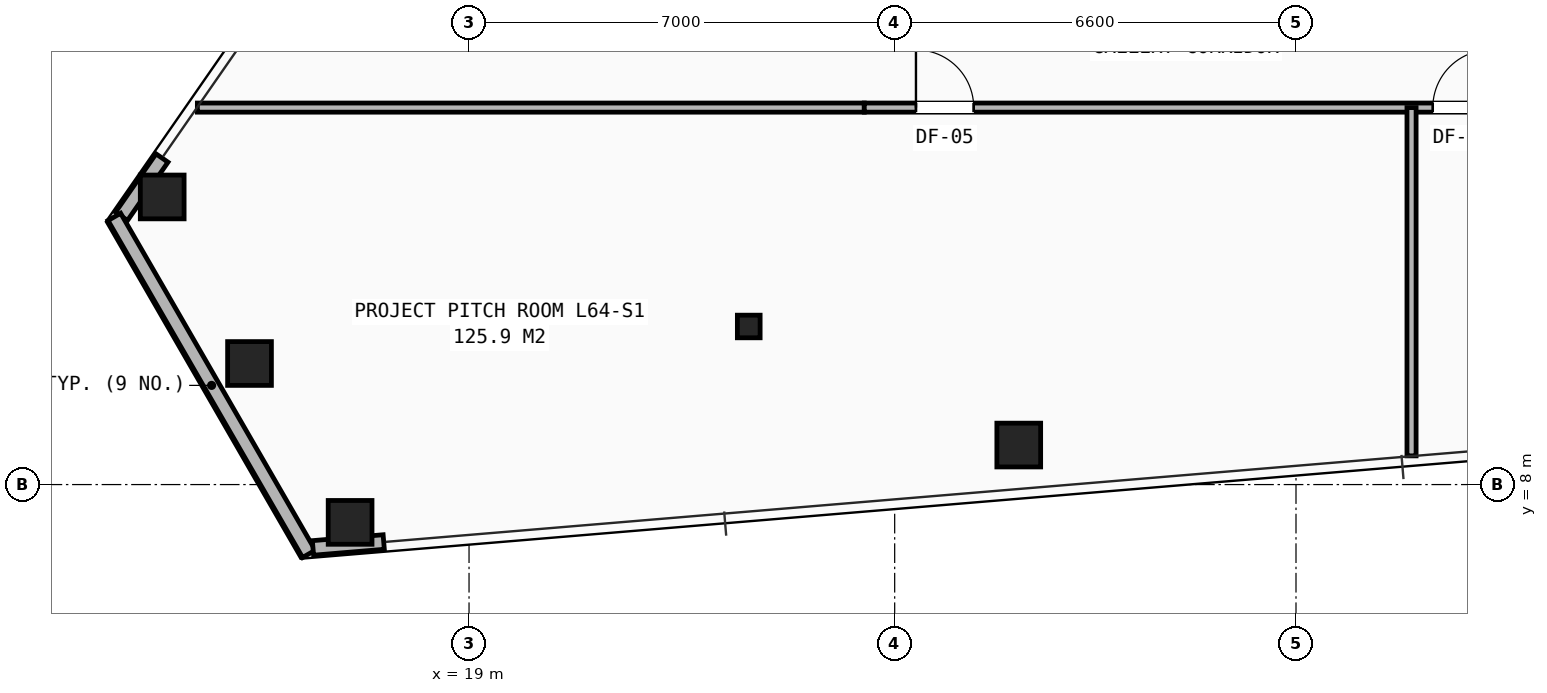
"""IFC4 building model, lengths in metres.
Left out: names, types, materials, properties, quantities, classifications, styles, units other than length and angle.
Written with IfcOpenShell. Run it as: python <this file> out.ifc"""

import sys

from ifc_helpers import new_model, si_unit, direction, frame, frame_2d, origin, origin_2d, place, context, subcontext, project, spatial, rectangle, hollow_rectangle, i_section, extrude, element, fill, save


model = new_model("IFC4")
c1 = context("Model", 3, precision=1e-05, world=origin(), true_north=direction((0.0, 1.0)))
c2 = subcontext(c1, "Body", "Model", "MODEL_VIEW")
j1 = project(units=[si_unit("LENGTHUNIT", "METRE"), si_unit("PLANEANGLEUNIT", "RADIAN")], contexts=[c1])
p1 = place(None, origin())
s1 = spatial("IfcSite", under=j1, at=p1, CompositionType="ELEMENT")
p2 = place(p1, origin())
s2 = spatial("IfcBuilding", under=s1, at=p2, CompositionType="ELEMENT")
p3 = place(p2, frame((0.0, 0.0, 225.9)))
s3 = spatial("IfcBuildingStorey", under=s2, at=p3, CompositionType="ELEMENT", Elevation=225.9)
p4 = place(p3, frame((23.6, 10.6, 0.0), z_axis=(0.0, 0.0, 1.0), x_axis=(1.0, 0.0, 0.0)))
e1 = element("IfcColumn", 1, at=p4, inside=s3, PredefinedType="COLUMN", context=c2, shape_type="SweptSolid", body=[
    extrude(i_section(OverallWidth=0.374, OverallDepth=0.372, WebThickness=0.016, FlangeThickness=0.026, at=origin_2d()), origin(), (0.0, 0.0, 1.0), 3.5),
])
for number, where, z_axis, x_axis in (
    (2, (13.954, 12.73, 0.0), (0.0, 0.0, 1.0), (1.0, 0.0, 0.0)),
    (3, (15.39, 9.991, 0.0), (0.0, 0.0, 1.0), (1.0, 0.0, 0.0)),
    (4, (17.044, 7.378, 0.0), (0.0, 0.0, 1.0), (1.0, 0.0, 0.0)),
    (5, (28.041, 8.65, 0.0), (0.0, 0.0, 1.0), (1.0, 0.0, 0.0)),
):
    element("IfcColumn", number, at=place(p3, frame(where, z_axis=z_axis, x_axis=x_axis)), inside=s3, PredefinedType="COLUMN", context=c2, shape_type="SweptSolid", body=[
        extrude(hollow_rectangle(XDim=0.72, YDim=0.72, WallThickness=0.05, at=origin_2d()), origin(), (0.0, 0.0, 1.0), 3.5),
    ])
p5 = place(p3, frame((13.95, 13.371, 0.0), z_axis=(0.0, 0.0, 1.0), x_axis=(-0.57028607051, -0.821446162437, 0.0)))
e6 = element("IfcWall", 6, at=p5, inside=s3, PredefinedType="SHEAR", context=c2, shape_type="SweptSolid", body=[
    extrude(rectangle(XDim=1.167, YDim=0.24, at=frame_2d((0.584, 0.0))), origin(), (0.0, 0.0, 1.0), 2.623),
])
p6 = place(p3, frame((16.366, 6.86, 0.0), z_axis=(0.0, 0.0, 1.0), x_axis=(-0.499999833739, 0.866025499775, 0.0)))
e7 = element("IfcWall", 7, at=p6, inside=s3, PredefinedType="SHEAR", context=c2, shape_type="SweptSolid", body=[
    extrude(rectangle(XDim=6.4, YDim=0.24, at=frame_2d((3.2, 0.0))), origin(), (0.0, 0.0, 1.0), 2.623),
])
p7 = place(p3, frame((16.434, 6.958, 0.0), z_axis=(0.0, 0.0, 1.0), x_axis=(0.99652987462, 0.083235863609, 0.0)))
e8 = element("IfcWall", 8, at=p7, inside=s3, PredefinedType="SHEAR", context=c2, shape_type="SweptSolid", body=[
    extrude(rectangle(XDim=1.167, YDim=0.24, at=frame_2d((0.584, 0.0))), origin(), (0.0, 0.0, 1.0), 2.623),
])
p8 = place(p3, frame((14.532, 14.2, 0.0), z_axis=(0.0, 0.0, 1.0), x_axis=(1.0, 0.0, 0.0)))
e9 = element("IfcWall", 9, at=p8, inside=s3, PredefinedType="PARTITIONING", context=c2, shape_type="SweptSolid", body=[
    extrude(rectangle(XDim=10.968, YDim=0.15, at=frame_2d((5.484, 0.0))), origin(), (0.0, 0.0, 1.0), 2.292),
])
p9 = place(p3, frame((25.5, 14.2, 0.0), z_axis=(0.0, 0.0, 1.0), x_axis=(1.0, 0.0, 0.0)))
e10 = element("IfcWall", 10, at=p9, inside=s3, PredefinedType="PARTITIONING", context=c2, shape_type="SweptSolid", body=[
    extrude(rectangle(XDim=29.0, YDim=0.15, at=frame_2d((14.5, 0.0))), origin(), (0.0, 0.0, 1.0), 2.292),
])
p10 = place(p9, frame((0.85, 0.0, 0.0)))
e11 = element("IfcOpeningElement", 11, at=p10, cuts=e10, PredefinedType="OPENING", context=c2, shape_type="SweptSolid", body=[
    extrude(rectangle(XDim=0.95, YDim=2.1, at=frame_2d((0.475, 1.05))), frame((0.0, 0.085, 0.0), z_axis=(0.0, -1.0, 0.0), x_axis=(1.0, 0.0, 0.0)), (0.0, 0.0, 1.0), 0.17),
])
p11 = place(p9, frame((9.35, 0.0, 0.0)))
e12 = element("IfcOpeningElement", 12, at=p11, cuts=e10, PredefinedType="OPENING", context=c2, shape_type="SweptSolid", body=[
    extrude(rectangle(XDim=0.95, YDim=2.1, at=frame_2d((0.475, 1.05))), frame((0.0, 0.085, 0.0), z_axis=(0.0, -1.0, 0.0), x_axis=(1.0, 0.0, 0.0)), (0.0, 0.0, 1.0), 0.17),
])
p12 = place(p9, frame((16.05, 0.0, 0.0)))
e13 = element("IfcOpeningElement", 13, at=p12, cuts=e10, PredefinedType="OPENING", context=c2, shape_type="SweptSolid", body=[
    extrude(rectangle(XDim=0.95, YDim=2.1, at=frame_2d((0.475, 1.05))), frame((0.0, 0.085, 0.0), z_axis=(0.0, -1.0, 0.0), x_axis=(1.0, 0.0, 0.0)), (0.0, 0.0, 1.0), 0.17),
])
p13 = place(p3, frame((34.5, 8.472, 0.0), z_axis=(0.0, 0.0, 1.0), x_axis=(0.0, 1.0, 0.0)))
e14 = element("IfcWall", 14, at=p13, inside=s3, PredefinedType="PARTITIONING", context=c2, shape_type="SweptSolid", body=[
    extrude(rectangle(XDim=5.728, YDim=0.15, at=frame_2d((2.864, 0.0))), origin(), (0.0, 0.0, 1.0), 2.292),
])
p14 = place(p10, origin())
e15 = element("IfcDoor", 15, at=p14, inside=s3, OperationType="SINGLE_SWING_LEFT", PredefinedType="DOOR", context=c2, shape_type="SweptSolid", body=[
    extrude(rectangle(XDim=0.95, YDim=2.1, at=frame_2d((0.475, 1.05))), frame((0.0, 0.025, 0.0), z_axis=(0.0, -1.0, 0.0), x_axis=(1.0, 0.0, 0.0)), (0.0, 0.0, 1.0), 0.05),
])
fill(e11, e15)
p15 = place(p11, origin())
e16 = element("IfcDoor", 16, at=p15, inside=s3, OperationType="SINGLE_SWING_RIGHT", PredefinedType="DOOR", context=c2, shape_type="SweptSolid", body=[
    extrude(rectangle(XDim=0.95, YDim=2.1, at=frame_2d((0.475, 1.05))), frame((0.0, 0.025, 0.0), z_axis=(0.0, -1.0, 0.0), x_axis=(1.0, 0.0, 0.0)), (0.0, 0.0, 1.0), 0.05),
])
fill(e12, e16)
save(model, sys.argv[1])
